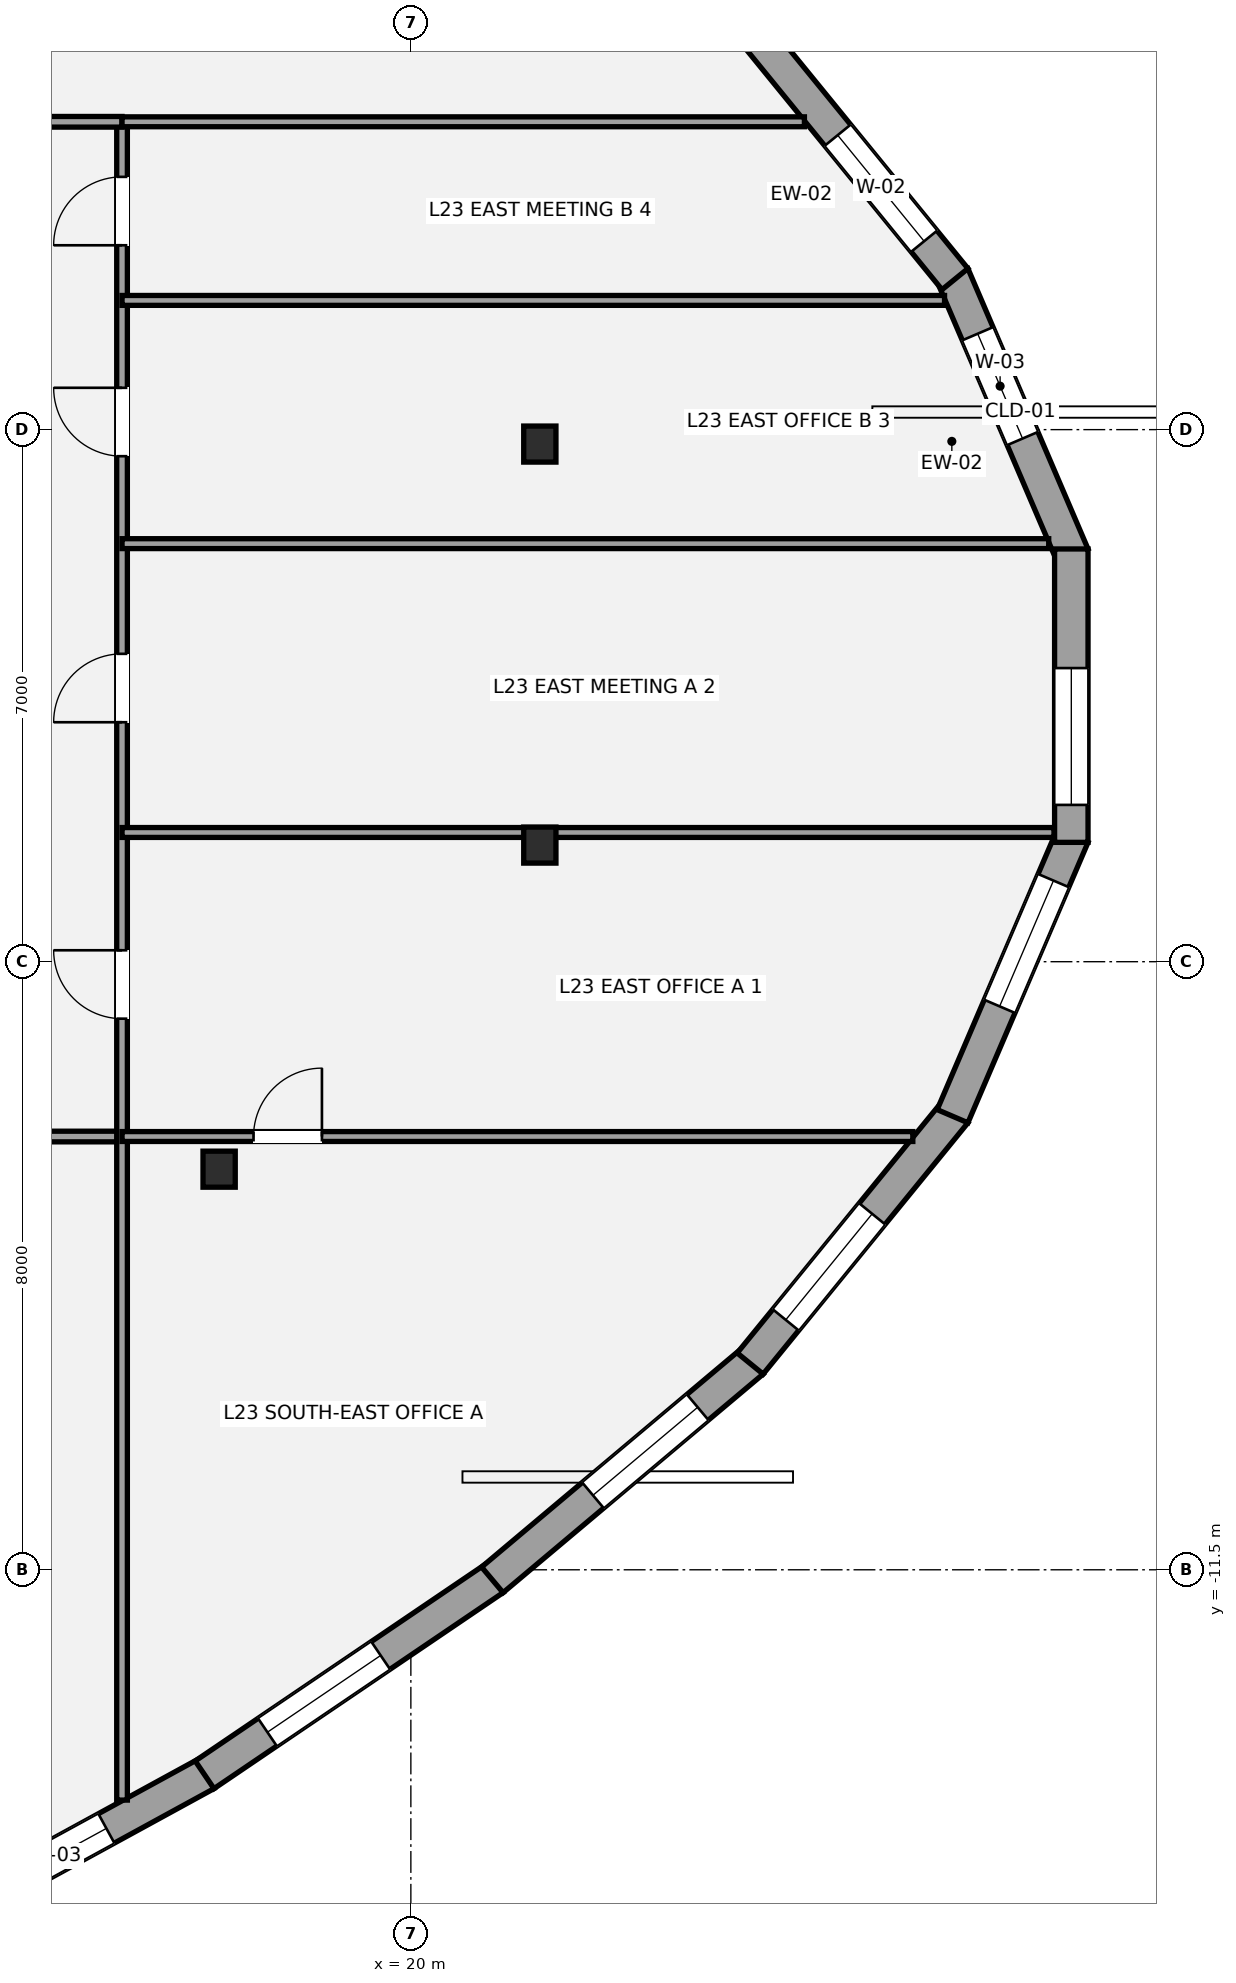
"""IFC4 building model, lengths in metres.
Left out: names, types, materials, properties, quantities, classifications, styles, units other than length and angle.
Written with IfcOpenShell. Run it as: python <this file> out.ifc"""

import sys

from ifc_helpers import new_model, si_unit, direction, frame, frame_2d, origin, origin_2d, place, context, subcontext, project, spatial, rectangle, i_section, extrude, element, fill, save


model = new_model("IFC4")
c1 = context("Model", 3, precision=1e-05, world=origin(), true_north=direction((0.0, 1.0)))
c2 = subcontext(c1, "Body", "Model", "MODEL_VIEW")
j1 = project(units=[si_unit("LENGTHUNIT", "METRE"), si_unit("PLANEANGLEUNIT", "RADIAN")], contexts=[c1])
p1 = place(None, origin())
s1 = spatial("IfcSite", under=j1, at=p1, CompositionType="ELEMENT")
p2 = place(p1, origin())
s2 = spatial("IfcBuilding", under=s1, at=p2, CompositionType="ELEMENT")
p3 = place(p2, frame((0.0, 0.0, 89.6)))
s3 = spatial("IfcBuildingStorey", under=s2, at=p3, CompositionType="ELEMENT", Elevation=89.6)
for number, where, z_axis, x_axis in (
    (1, (21.697, 3.31, 0.0), (0.0, 0.0, 1.0), (1.0, 0.0, 0.0)),
    (2, (17.477, -6.229, 0.0), (0.0, 0.0, 1.0), (1.0, 0.0, 0.0)),
    (3, (21.697, -1.966, 0.0), (0.0, 0.0, 1.0), (1.0, 0.0, 0.0)),
):
    element("IfcColumn", number, at=place(p3, frame(where, z_axis=z_axis, x_axis=x_axis)), inside=s3, PredefinedType="COLUMN", context=c2, shape_type="SweptSolid", body=[
        extrude(i_section(OverallWidth=0.424, OverallDepth=0.474, WebThickness=0.048, FlangeThickness=0.077, at=origin_2d()), origin(), (0.0, 0.0, 1.0), 3.5),
    ])
p4 = place(p3, frame((27.127, 5.533, 0.0), z_axis=(0.0, 0.0, 1.0), x_axis=(0.393757776232, -0.919214237083, 0.0)))
e4 = element("IfcWall", 4, at=p4, inside=s3, PredefinedType="STANDARD", context=c2, shape_type="SweptSolid", body=[
    extrude(rectangle(XDim=4.013, YDim=0.44, at=frame_2d((2.007, 0.0))), origin(), (0.0, 0.0, 1.0), 2.528),
])
p5 = place(p4, frame((0.839, 0.0, 0.65)))
e5 = element("IfcOpeningElement", 5, at=p5, cuts=e4, PredefinedType="OPENING", context=c2, shape_type="SweptSolid", body=[
    extrude(rectangle(XDim=1.5, YDim=1.7, at=frame_2d((0.75, 0.85))), frame((0.0, 0.23, 0.0), z_axis=(0.0, -1.0, 0.0), x_axis=(1.0, 0.0, 0.0)), (0.0, 0.0, 1.0), 0.46),
])
p6 = place(p3, frame((24.464, 8.787, 0.0), z_axis=(0.0, 0.0, 1.0), x_axis=(0.631768505266, -0.775157116818, 0.0)))
e6 = element("IfcWall", 6, at=p6, inside=s3, PredefinedType="STANDARD", context=c2, shape_type="SweptSolid", body=[
    extrude(rectangle(XDim=4.265, YDim=0.44, at=frame_2d((2.133, 0.0))), origin(), (0.0, 0.0, 1.0), 2.528),
])
p7 = place(p6, frame((1.823, 0.0, 0.65)))
e7 = element("IfcOpeningElement", 7, at=p7, cuts=e6, PredefinedType="OPENING", context=c2, shape_type="SweptSolid", body=[
    extrude(rectangle(XDim=1.8, YDim=1.7, at=frame_2d((0.9, 0.85))), frame((0.0, 0.23, 0.0), z_axis=(0.0, -1.0, 0.0), x_axis=(1.0, 0.0, 0.0)), (0.0, 0.0, 1.0), 0.46),
])
p8 = place(p3, frame((17.304, -14.186, 0.0), z_axis=(0.0, 0.0, 1.0), x_axis=(-0.877445532469, -0.479676284123, 0.0)))
e8 = element("IfcWall", 8, at=p8, inside=s3, PredefinedType="STANDARD", context=c2, shape_type="SweptSolid", body=[
    extrude(rectangle(XDim=4.835, YDim=0.44, at=frame_2d((2.417, 0.0))), origin(), (0.0, 0.0, 1.0), 2.528),
])
p9 = place(p8, frame((1.493, 0.0, 0.65)))
e9 = element("IfcOpeningElement", 9, at=p9, cuts=e8, PredefinedType="OPENING", context=c2, shape_type="SweptSolid", body=[
    extrude(rectangle(XDim=1.5, YDim=1.7, at=frame_2d((0.75, 0.85))), frame((0.0, 0.23, 0.0), z_axis=(0.0, -1.0, 0.0), x_axis=(1.0, 0.0, 0.0)), (0.0, 0.0, 1.0), 0.46),
])
p10 = place(p3, frame((21.09, -11.619, 0.0), z_axis=(0.0, 0.0, 1.0), x_axis=(-0.827742791179, -0.561107718403, 0.0)))
e10 = element("IfcWall", 10, at=p10, inside=s3, PredefinedType="STANDARD", context=c2, shape_type="SweptSolid", body=[
    extrude(rectangle(XDim=4.595, YDim=0.44, at=frame_2d((2.298, 0.0))), origin(), (0.0, 0.0, 1.0), 2.528),
])
p11 = place(p10, frame((1.797, 0.0, 0.65)))
e11 = element("IfcOpeningElement", 11, at=p11, cuts=e10, PredefinedType="OPENING", context=c2, shape_type="SweptSolid", body=[
    extrude(rectangle(XDim=1.8, YDim=1.7, at=frame_2d((0.9, 0.85))), frame((0.0, 0.23, 0.0), z_axis=(0.0, -1.0, 0.0), x_axis=(1.0, 0.0, 0.0)), (0.0, 0.0, 1.0), 0.46),
])
p12 = place(p3, frame((24.493, -8.757, 0.0), z_axis=(0.0, 0.0, 1.0), x_axis=(-0.765563867956, -0.643359902449, 0.0)))
e12 = element("IfcWall", 12, at=p12, inside=s3, PredefinedType="STANDARD", context=c2, shape_type="SweptSolid", body=[
    extrude(rectangle(XDim=4.469, YDim=0.44, at=frame_2d((2.234, 0.0))), origin(), (0.0, 0.0, 1.0), 2.528),
])
p13 = place(p12, frame((0.94, 0.0, 0.65)))
e13 = element("IfcOpeningElement", 13, at=p13, cuts=e12, PredefinedType="OPENING", context=c2, shape_type="SweptSolid", body=[
    extrude(rectangle(XDim=1.8, YDim=1.7, at=frame_2d((0.9, 0.85))), frame((0.0, 0.23, 0.0), z_axis=(0.0, -1.0, 0.0), x_axis=(1.0, 0.0, 0.0)), (0.0, 0.0, 1.0), 0.46),
])
p14 = place(p3, frame((27.159, -5.48, 0.0), z_axis=(0.0, 0.0, 1.0), x_axis=(-0.631768505266, -0.775157116818, 0.0)))
e14 = element("IfcWall", 14, at=p14, inside=s3, PredefinedType="STANDARD", context=c2, shape_type="SweptSolid", body=[
    extrude(rectangle(XDim=4.265, YDim=0.44, at=frame_2d((2.133, 0.0))), origin(), (0.0, 0.0, 1.0), 2.528),
])
p15 = place(p14, frame((1.724, 0.0, 0.65)))
e15 = element("IfcOpeningElement", 15, at=p15, cuts=e14, PredefinedType="OPENING", context=c2, shape_type="SweptSolid", body=[
    extrude(rectangle(XDim=1.8, YDim=1.7, at=frame_2d((0.9, 0.85))), frame((0.0, 0.23, 0.0), z_axis=(0.0, -1.0, 0.0), x_axis=(1.0, 0.0, 0.0)), (0.0, 0.0, 1.0), 0.46),
])
p16 = place(p3, frame((28.708, -1.844, 0.0), z_axis=(0.0, 0.0, 1.0), x_axis=(-0.393757776232, -0.919214237083, 0.0)))
e16 = element("IfcWall", 16, at=p16, inside=s3, PredefinedType="STANDARD", context=c2, shape_type="SweptSolid", body=[
    extrude(rectangle(XDim=4.013, YDim=0.44, at=frame_2d((2.007, 0.0))), origin(), (0.0, 0.0, 1.0), 2.528),
])
p17 = place(p16, frame((0.641, 0.0, 0.65)))
e17 = element("IfcOpeningElement", 17, at=p17, cuts=e16, PredefinedType="OPENING", context=c2, shape_type="SweptSolid", body=[
    extrude(rectangle(XDim=1.8, YDim=1.7, at=frame_2d((0.9, 0.85))), frame((0.0, 0.23, 0.0), z_axis=(0.0, -1.0, 0.0), x_axis=(1.0, 0.0, 0.0)), (0.0, 0.0, 1.0), 0.46),
])
p18 = place(p3, frame((28.69, 1.93, 0.0), z_axis=(0.0, 0.0, 1.0), x_axis=(0.0, -1.0, 0.0)))
e18 = element("IfcWall", 18, at=p18, inside=s3, PredefinedType="STANDARD", context=c2, shape_type="SweptSolid", body=[
    extrude(rectangle(XDim=3.86, YDim=0.44, at=frame_2d((1.93, 0.0))), origin(), (0.0, 0.0, 1.0), 2.528),
])
p19 = place(p18, frame((1.567, 0.0, 0.65)))
e19 = element("IfcOpeningElement", 19, at=p19, cuts=e18, PredefinedType="OPENING", context=c2, shape_type="SweptSolid", body=[
    extrude(rectangle(XDim=1.8, YDim=1.7, at=frame_2d((0.9, 0.85))), frame((0.0, 0.23, 0.0), z_axis=(0.0, -1.0, 0.0), x_axis=(1.0, 0.0, 0.0)), (0.0, 0.0, 1.0), 0.46),
])
p20 = place(p3, frame((-16.2, -5.8, 0.0), z_axis=(0.0, 0.0, 1.0), x_axis=(1.0, 0.0, 0.0)))
e20 = element("IfcWall", 20, at=p20, inside=s3, PredefinedType="PARTITIONING", context=c2, shape_type="SweptSolid", body=[
    extrude(rectangle(XDim=32.4, YDim=0.14, at=frame_2d((16.2, 0.0))), origin(), (0.0, 0.0, 1.0), 2.763),
])
p21 = place(p20, frame((4.25, 0.0, 0.0)))
e21 = element("IfcOpeningElement", 21, at=p21, cuts=e20, PredefinedType="OPENING", context=c2, shape_type="SweptSolid", body=[
    extrude(rectangle(XDim=0.9, YDim=2.1, at=frame_2d((0.45, 1.05))), frame((0.0, 0.08, 0.0), z_axis=(0.0, -1.0, 0.0), x_axis=(1.0, 0.0, 0.0)), (0.0, 0.0, 1.0), 0.16),
])
p22 = place(p20, frame((13.15, 0.0, 0.0)))
e22 = element("IfcOpeningElement", 22, at=p22, cuts=e20, PredefinedType="OPENING", context=c2, shape_type="SweptSolid", body=[
    extrude(rectangle(XDim=1.5, YDim=2.15, at=frame_2d((0.75, 1.075))), frame((0.0, 0.08, 0.0), z_axis=(0.0, -1.0, 0.0), x_axis=(1.0, 0.0, 0.0)), (0.0, 0.0, 1.0), 0.16),
])
p23 = place(p20, frame((21.45, 0.0, 0.0)))
e23 = element("IfcOpeningElement", 23, at=p23, cuts=e20, PredefinedType="OPENING", context=c2, shape_type="SweptSolid", body=[
    extrude(rectangle(XDim=0.9, YDim=2.1, at=frame_2d((0.45, 1.05))), frame((0.0, 0.08, 0.0), z_axis=(0.0, -1.0, 0.0), x_axis=(1.0, 0.0, 0.0)), (0.0, 0.0, 1.0), 0.16),
])
p24 = place(p20, frame((28.15, 0.0, 0.0)))
e24 = element("IfcOpeningElement", 24, at=p24, cuts=e20, PredefinedType="OPENING", context=c2, shape_type="SweptSolid", body=[
    extrude(rectangle(XDim=1.5, YDim=2.15, at=frame_2d((0.75, 1.075))), frame((0.0, 0.08, 0.0), z_axis=(0.0, -1.0, 0.0), x_axis=(1.0, 0.0, 0.0)), (0.0, 0.0, 1.0), 0.16),
])
p25 = place(p3, frame((16.2, -14.53, 0.0), z_axis=(0.0, 0.0, 1.0), x_axis=(0.0, 1.0, 0.0)))
e25 = element("IfcWall", 25, at=p25, inside=s3, PredefinedType="PARTITIONING", context=c2, shape_type="SweptSolid", body=[
    extrude(rectangle(XDim=22.08, YDim=0.14, at=frame_2d((11.04, 0.0))), origin(), (0.0, 0.0, 1.0), 2.751),
])
p26 = place(p25, frame((10.281, 0.0, 0.0)))
e26 = element("IfcOpeningElement", 26, at=p26, cuts=e25, PredefinedType="OPENING", context=c2, shape_type="SweptSolid", body=[
    extrude(rectangle(XDim=0.9, YDim=2.1, at=frame_2d((0.45, 1.05))), frame((0.0, 0.08, 0.0), z_axis=(0.0, -1.0, 0.0), x_axis=(1.0, 0.0, 0.0)), (0.0, 0.0, 1.0), 0.16),
])
p27 = place(p25, frame((14.18, 0.0, 0.0)))
e27 = element("IfcOpeningElement", 27, at=p27, cuts=e25, PredefinedType="OPENING", context=c2, shape_type="SweptSolid", body=[
    extrude(rectangle(XDim=0.9, YDim=2.1, at=frame_2d((0.45, 1.05))), frame((0.0, 0.08, 0.0), z_axis=(0.0, -1.0, 0.0), x_axis=(1.0, 0.0, 0.0)), (0.0, 0.0, 1.0), 0.16),
])
p28 = place(p25, frame((17.68, 0.0, 0.0)))
e28 = element("IfcOpeningElement", 28, at=p28, cuts=e25, PredefinedType="OPENING", context=c2, shape_type="SweptSolid", body=[
    extrude(rectangle(XDim=0.9, YDim=2.1, at=frame_2d((0.45, 1.05))), frame((0.0, 0.08, 0.0), z_axis=(0.0, -1.0, 0.0), x_axis=(1.0, 0.0, 0.0)), (0.0, 0.0, 1.0), 0.16),
])
p29 = place(p25, frame((20.455, 0.0, 0.0)))
e29 = element("IfcOpeningElement", 29, at=p29, cuts=e25, PredefinedType="OPENING", context=c2, shape_type="SweptSolid", body=[
    extrude(rectangle(XDim=0.9, YDim=2.1, at=frame_2d((0.45, 1.05))), frame((0.0, 0.08, 0.0), z_axis=(0.0, -1.0, 0.0), x_axis=(1.0, 0.0, 0.0)), (0.0, 0.0, 1.0), 0.16),
])
p30 = place(p3, frame((13.9, 7.55, 0.0), z_axis=(0.0, 0.0, 1.0), x_axis=(1.0, 0.0, 0.0)))
e30 = element("IfcWall", 30, at=p30, inside=s3, PredefinedType="PARTITIONING", context=c2, shape_type="SweptSolid", body=[
    extrude(rectangle(XDim=2.3, YDim=0.14, at=frame_2d((1.15, 0.0))), origin(), (0.0, 0.0, 1.0), 2.763),
])
p31 = place(p30, frame((0.32, 0.0, 0.0)))
e31 = element("IfcOpeningElement", 31, at=p31, cuts=e30, PredefinedType="OPENING", context=c2, shape_type="SweptSolid", body=[
    extrude(rectangle(XDim=0.92, YDim=2.15, at=frame_2d((0.46, 1.075))), frame((0.0, 0.08, 0.0), z_axis=(0.0, -1.0, 0.0), x_axis=(1.0, 0.0, 0.0)), (0.0, 0.0, 1.0), 0.16),
])
p32 = place(p3, frame((16.2, 7.55, 0.0), z_axis=(0.0, 0.0, 1.0), x_axis=(1.0, 0.0, 0.0)))
e32 = element("IfcWall", 32, at=p32, inside=s3, PredefinedType="PARTITIONING", context=c2, shape_type="SweptSolid", body=[
    extrude(rectangle(XDim=8.978, YDim=0.13, at=frame_2d((4.489, 0.0))), origin(), (0.0, 0.0, 1.0), 2.763),
])
p33 = place(p3, frame((16.2, -5.8, 0.0), z_axis=(0.0, 0.0, 1.0), x_axis=(1.0, 0.0, 0.0)))
e33 = element("IfcWall", 33, at=p33, inside=s3, PredefinedType="PARTITIONING", context=c2, shape_type="SweptSolid", body=[
    extrude(rectangle(XDim=10.404, YDim=0.13, at=frame_2d((5.202, 0.0))), origin(), (0.0, 0.0, 1.0), 2.688),
])
p34 = place(p33, frame((1.73, 0.0, 0.0)))
e34 = element("IfcOpeningElement", 34, at=p34, cuts=e33, PredefinedType="OPENING", context=c2, shape_type="SweptSolid", body=[
    extrude(rectangle(XDim=0.9, YDim=2.1, at=frame_2d((0.45, 1.05))), frame((0.0, 0.075, 0.0), z_axis=(0.0, -1.0, 0.0), x_axis=(1.0, 0.0, 0.0)), (0.0, 0.0, 1.0), 0.15),
])
p35 = place(p3, frame((16.2, -1.8, 0.0), z_axis=(0.0, 0.0, 1.0), x_axis=(1.0, 0.0, 0.0)))
e35 = element("IfcWall", 35, at=p35, inside=s3, PredefinedType="PARTITIONING", context=c2, shape_type="SweptSolid", body=[
    extrude(rectangle(XDim=12.262, YDim=0.13, at=frame_2d((6.131, 0.0))), origin(), (0.0, 0.0, 1.0), 2.751),
])
p36 = place(p3, frame((16.2, 2.0, 0.0), z_axis=(0.0, 0.0, 1.0), x_axis=(1.0, 0.0, 0.0)))
e36 = element("IfcWall", 36, at=p36, inside=s3, PredefinedType="PARTITIONING", context=c2, shape_type="SweptSolid", body=[
    extrude(rectangle(XDim=12.192, YDim=0.13, at=frame_2d((6.096, 0.0))), origin(), (0.0, 0.0, 1.0), 2.751),
])
p37 = place(p3, frame((16.2, 5.2, 0.0), z_axis=(0.0, 0.0, 1.0), x_axis=(1.0, 0.0, 0.0)))
e37 = element("IfcWall", 37, at=p37, inside=s3, PredefinedType="PARTITIONING", context=c2, shape_type="SweptSolid", body=[
    extrude(rectangle(XDim=10.822, YDim=0.13, at=frame_2d((5.411, 0.0))), origin(), (0.0, 0.0, 1.0), 2.763),
])
p38 = place(p5, origin())
e38 = element("IfcWindow", 38, at=p38, inside=s3, PartitioningType="SINGLE_PANEL", PredefinedType="WINDOW", context=c2, shape_type="SweptSolid", body=[
    extrude(rectangle(XDim=1.5, YDim=1.7, at=frame_2d((0.75, 0.85))), frame((0.0, -0.01, 0.0), z_axis=(0.0, -1.0, 0.0), x_axis=(1.0, 0.0, 0.0)), (0.0, 0.0, 1.0), 0.06),
])
fill(e5, e38)
p39 = place(p7, origin())
e39 = element("IfcWindow", 39, at=p39, inside=s3, PartitioningType="SINGLE_PANEL", PredefinedType="WINDOW", context=c2, shape_type="SweptSolid", body=[
    extrude(rectangle(XDim=1.8, YDim=1.7, at=frame_2d((0.9, 0.85))), frame((0.0, -0.01, 0.0), z_axis=(0.0, -1.0, 0.0), x_axis=(1.0, 0.0, 0.0)), (0.0, 0.0, 1.0), 0.06),
])
fill(e7, e39)
p40 = place(p9, origin())
e40 = element("IfcWindow", 40, at=p40, inside=s3, PartitioningType="SINGLE_PANEL", PredefinedType="WINDOW", context=c2, shape_type="SweptSolid", body=[
    extrude(rectangle(XDim=1.5, YDim=1.7, at=frame_2d((0.75, 0.85))), frame((0.0, -0.01, 0.0), z_axis=(0.0, -1.0, 0.0), x_axis=(1.0, 0.0, 0.0)), (0.0, 0.0, 1.0), 0.06),
])
fill(e9, e40)
p41 = place(p11, origin())
e41 = element("IfcWindow", 41, at=p41, inside=s3, PartitioningType="SINGLE_PANEL", PredefinedType="WINDOW", context=c2, shape_type="SweptSolid", body=[
    extrude(rectangle(XDim=1.8, YDim=1.7, at=frame_2d((0.9, 0.85))), frame((0.0, -0.01, 0.0), z_axis=(0.0, -1.0, 0.0), x_axis=(1.0, 0.0, 0.0)), (0.0, 0.0, 1.0), 0.06),
])
fill(e11, e41)
p42 = place(p13, origin())
e42 = element("IfcWindow", 42, at=p42, inside=s3, PartitioningType="SINGLE_PANEL", PredefinedType="WINDOW", context=c2, shape_type="SweptSolid", body=[
    extrude(rectangle(XDim=1.8, YDim=1.7, at=frame_2d((0.9, 0.85))), frame((0.0, -0.01, 0.0), z_axis=(0.0, -1.0, 0.0), x_axis=(1.0, 0.0, 0.0)), (0.0, 0.0, 1.0), 0.06),
])
fill(e13, e42)
p43 = place(p15, origin())
e43 = element("IfcWindow", 43, at=p43, inside=s3, PartitioningType="SINGLE_PANEL", PredefinedType="WINDOW", context=c2, shape_type="SweptSolid", body=[
    extrude(rectangle(XDim=1.8, YDim=1.7, at=frame_2d((0.9, 0.85))), frame((0.0, -0.01, 0.0), z_axis=(0.0, -1.0, 0.0), x_axis=(1.0, 0.0, 0.0)), (0.0, 0.0, 1.0), 0.06),
])
fill(e15, e43)
p44 = place(p17, origin())
e44 = element("IfcWindow", 44, at=p44, inside=s3, PartitioningType="SINGLE_PANEL", PredefinedType="WINDOW", context=c2, shape_type="SweptSolid", body=[
    extrude(rectangle(XDim=1.8, YDim=1.7, at=frame_2d((0.9, 0.85))), frame((0.0, -0.01, 0.0), z_axis=(0.0, -1.0, 0.0), x_axis=(1.0, 0.0, 0.0)), (0.0, 0.0, 1.0), 0.06),
])
fill(e17, e44)
p45 = place(p19, origin())
e45 = element("IfcWindow", 45, at=p45, inside=s3, PartitioningType="SINGLE_PANEL", PredefinedType="WINDOW", context=c2, shape_type="SweptSolid", body=[
    extrude(rectangle(XDim=1.8, YDim=1.7, at=frame_2d((0.9, 0.85))), frame((0.0, -0.01, 0.0), z_axis=(0.0, -1.0, 0.0), x_axis=(1.0, 0.0, 0.0)), (0.0, 0.0, 1.0), 0.06),
])
fill(e19, e45)
p46 = place(p34, origin())
e46 = element("IfcDoor", 46, at=p46, inside=s3, OperationType="SINGLE_SWING_RIGHT", PredefinedType="DOOR", context=c2, shape_type="SweptSolid", body=[
    extrude(rectangle(XDim=0.9, YDim=2.1, at=frame_2d((0.45, 1.05))), frame((0.0, 0.025, 0.0), z_axis=(0.0, -1.0, 0.0), x_axis=(1.0, 0.0, 0.0)), (0.0, 0.0, 1.0), 0.05),
])
fill(e34, e46)
p47 = place(p26, origin())
e47 = element("IfcDoor", 47, at=p47, inside=s3, OperationType="SINGLE_SWING_RIGHT", PredefinedType="DOOR", context=c2, shape_type="SweptSolid", body=[
    extrude(rectangle(XDim=0.9, YDim=2.1, at=frame_2d((0.45, 1.05))), frame((0.0, 0.025, 0.0), z_axis=(0.0, -1.0, 0.0), x_axis=(1.0, 0.0, 0.0)), (0.0, 0.0, 1.0), 0.05),
])
fill(e26, e47)
p48 = place(p27, origin())
e48 = element("IfcDoor", 48, at=p48, inside=s3, OperationType="SINGLE_SWING_LEFT", PredefinedType="DOOR", context=c2, shape_type="SweptSolid", body=[
    extrude(rectangle(XDim=0.9, YDim=2.1, at=frame_2d((0.45, 1.05))), frame((0.0, 0.025, 0.0), z_axis=(0.0, -1.0, 0.0), x_axis=(1.0, 0.0, 0.0)), (0.0, 0.0, 1.0), 0.05),
])
fill(e27, e48)
p49 = place(p28, origin())
e49 = element("IfcDoor", 49, at=p49, inside=s3, OperationType="SINGLE_SWING_RIGHT", PredefinedType="DOOR", context=c2, shape_type="SweptSolid", body=[
    extrude(rectangle(XDim=0.9, YDim=2.1, at=frame_2d((0.45, 1.05))), frame((0.0, 0.025, 0.0), z_axis=(0.0, -1.0, 0.0), x_axis=(1.0, 0.0, 0.0)), (0.0, 0.0, 1.0), 0.05),
])
fill(e28, e49)
p50 = place(p29, origin())
e50 = element("IfcDoor", 50, at=p50, inside=s3, OperationType="SINGLE_SWING_LEFT", PredefinedType="DOOR", context=c2, shape_type="SweptSolid", body=[
    extrude(rectangle(XDim=0.9, YDim=2.1, at=frame_2d((0.45, 1.05))), frame((0.0, 0.025, 0.0), z_axis=(0.0, -1.0, 0.0), x_axis=(1.0, 0.0, 0.0)), (0.0, 0.0, 1.0), 0.05),
])
fill(e29, e50)
save(model, sys.argv[1])
